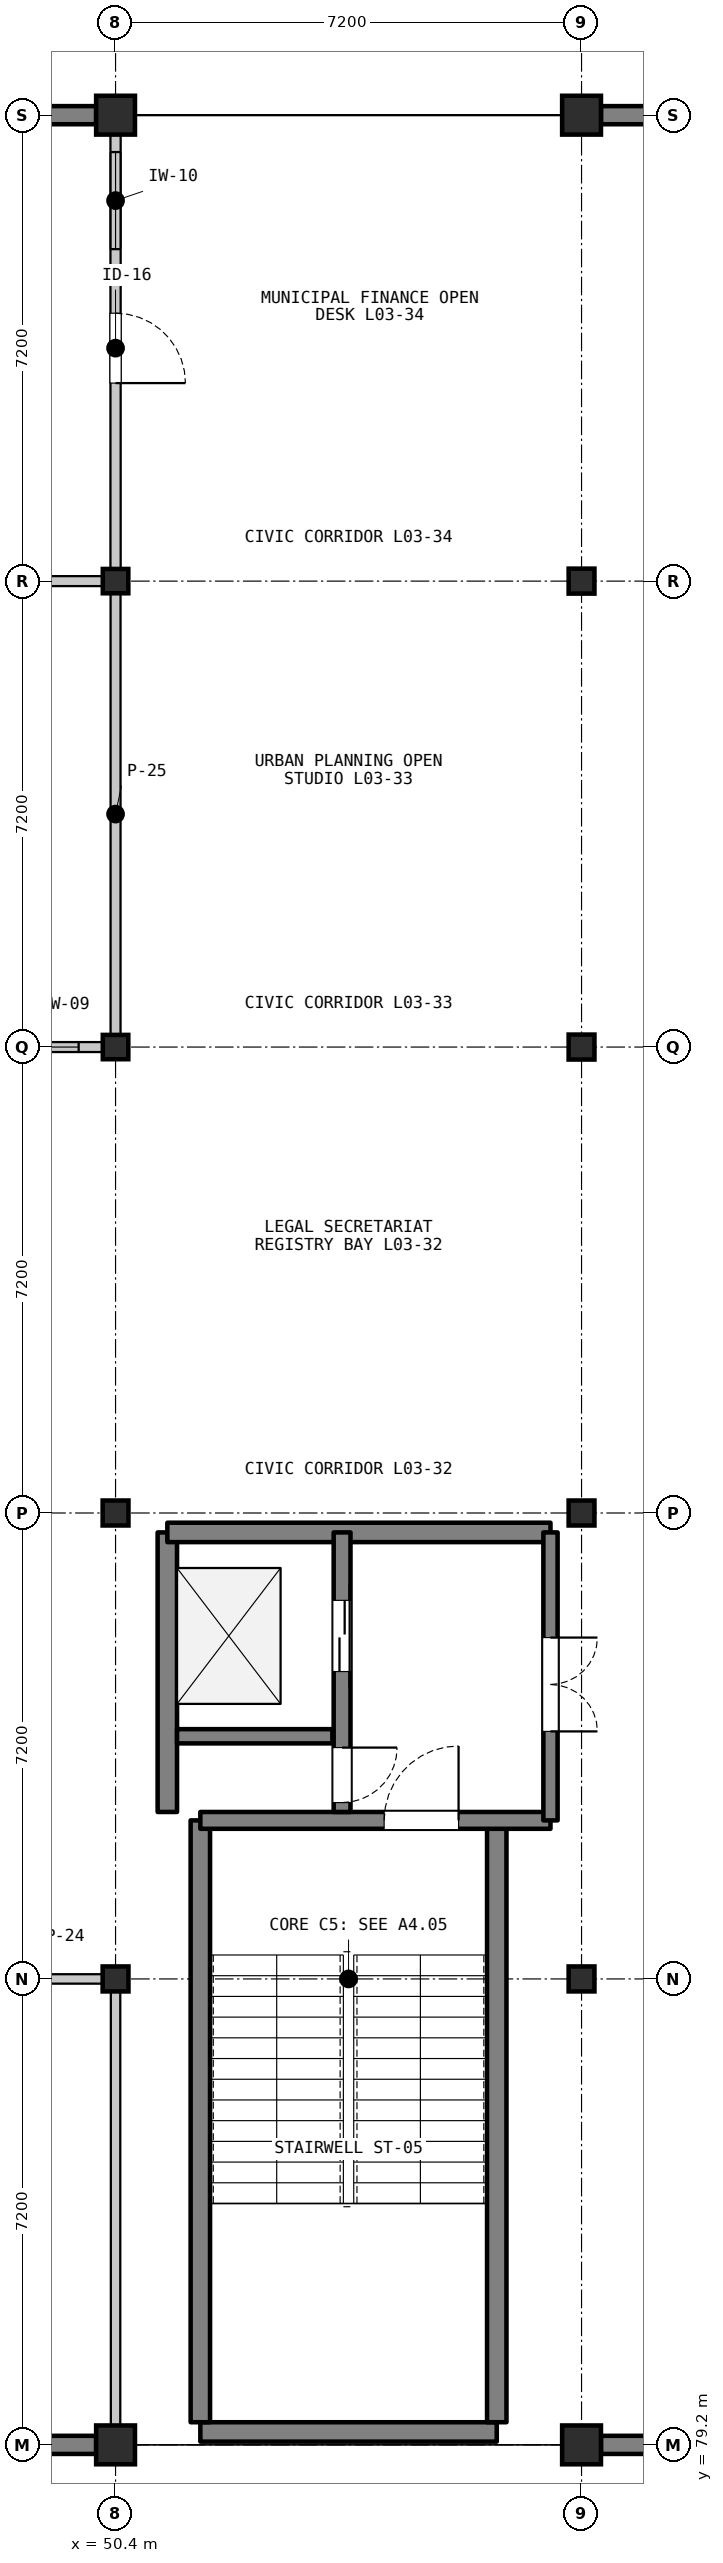
"""IFC4 building model, lengths in metres.
Left out: names, types, materials, properties, quantities, classifications, styles, units other than length and angle.
Written with IfcOpenShell. Run it as: python <this file> out.ifc"""

import sys

from ifc_helpers import new_model, si_unit, direction, frame, frame_2d, origin, origin_2d, place, context, subcontext, project, spatial, rectangle, i_section, extrude, element, fill, save


model = new_model("IFC4")
c1 = context("Model", 3, precision=1e-05, world=origin(), true_north=direction((0.0, 1.0)))
c2 = subcontext(c1, "Body", "Model", "MODEL_VIEW")
j1 = project(units=[si_unit("LENGTHUNIT", "METRE"), si_unit("PLANEANGLEUNIT", "RADIAN")], contexts=[c1])
p1 = place(None, origin())
s1 = spatial("IfcSite", under=j1, at=p1, CompositionType="ELEMENT")
p2 = place(p1, origin())
s2 = spatial("IfcBuilding", under=s1, at=p2, CompositionType="ELEMENT")
p3 = place(p2, frame((0.0, 0.0, 9.9)))
s3 = spatial("IfcBuildingStorey", under=s2, at=p3, CompositionType="ELEMENT", Elevation=9.9)
p4 = place(p3, frame((50.4, 79.2, 0.0), z_axis=(0.0, 0.0, 1.0), x_axis=(1.0, 0.0, 0.0)))
e1 = element("IfcColumn", 1, at=p4, inside=s3, PredefinedType="COLUMN", context=c2, shape_type="SweptSolid", body=[
    extrude(rectangle(XDim=0.6, YDim=0.6, at=origin_2d()), origin(), (0.0, 0.0, 1.0), 4.2),
])
for number, where, z_axis, x_axis in (
    (2, (50.4, 86.4, 0.0), (0.0, 0.0, 1.0), (1.0, 0.0, 0.0)),
    (3, (50.4, 93.6, 0.0), (0.0, 0.0, 1.0), (1.0, 0.0, 0.0)),
):
    element("IfcColumn", number, at=place(p3, frame(where, z_axis=z_axis, x_axis=x_axis)), inside=s3, PredefinedType="COLUMN", context=c2, shape_type="SweptSolid", body=[
        extrude(i_section(OverallWidth=0.399, OverallDepth=0.386, WebThickness=0.021, FlangeThickness=0.033, FilletRadius=0.015, at=origin_2d()), origin(), (0.0, 0.0, 1.0), 4.2),
    ])
for number, where, z_axis, x_axis in (
    (4, (50.4, 100.8, 0.0), (0.0, 0.0, 1.0), (1.0, 0.0, 0.0)),
    (5, (50.4, 108.0, 0.0), (0.0, 0.0, 1.0), (1.0, 0.0, 0.0)),
):
    element("IfcColumn", number, at=place(p3, frame(where, z_axis=z_axis, x_axis=x_axis)), inside=s3, PredefinedType="COLUMN", context=c2, shape_type="SweptSolid", body=[
        extrude(i_section(OverallWidth=0.394, OverallDepth=0.376, WebThickness=0.017, FlangeThickness=0.028, FilletRadius=0.015, at=origin_2d()), origin(), (0.0, 0.0, 1.0), 4.2),
    ])
for number, where, z_axis, x_axis in (
    (6, (50.4, 115.2, 0.0), (0.0, 0.0, 1.0), (1.0, 0.0, 0.0)),
    (7, (57.6, 79.2, 0.0), (0.0, 0.0, 1.0), (1.0, 0.0, 0.0)),
):
    element("IfcColumn", number, at=place(p3, frame(where, z_axis=z_axis, x_axis=x_axis)), inside=s3, PredefinedType="COLUMN", context=c2, shape_type="SweptSolid", body=[
        extrude(rectangle(XDim=0.6, YDim=0.6, at=origin_2d()), origin(), (0.0, 0.0, 1.0), 4.2),
    ])
for number, where, z_axis, x_axis in (
    (8, (57.6, 86.4, 0.0), (0.0, 0.0, 1.0), (1.0, 0.0, 0.0)),
    (9, (57.6, 93.6, 0.0), (0.0, 0.0, 1.0), (1.0, 0.0, 0.0)),
    (10, (57.6, 100.8, 0.0), (0.0, 0.0, 1.0), (1.0, 0.0, 0.0)),
    (11, (57.6, 108.0, 0.0), (0.0, 0.0, 1.0), (1.0, 0.0, 0.0)),
):
    element("IfcColumn", number, at=place(p3, frame(where, z_axis=z_axis, x_axis=x_axis)), inside=s3, PredefinedType="COLUMN", context=c2, shape_type="SweptSolid", body=[
        extrude(i_section(OverallWidth=0.399, OverallDepth=0.386, WebThickness=0.021, FlangeThickness=0.033, FilletRadius=0.015, at=origin_2d()), origin(), (0.0, 0.0, 1.0), 4.2),
    ])
p5 = place(p3, frame((57.6, 115.2, 0.0), z_axis=(0.0, 0.0, 1.0), x_axis=(1.0, 0.0, 0.0)))
e12 = element("IfcColumn", 12, at=p5, inside=s3, PredefinedType="COLUMN", context=c2, shape_type="SweptSolid", body=[
    extrude(rectangle(XDim=0.6, YDim=0.6, at=origin_2d()), origin(), (0.0, 0.0, 1.0), 4.2),
])
p6 = place(p3, frame((50.1, 79.2, 0.0), z_axis=(0.0, 0.0, 1.0), x_axis=(-1.0, 0.0, 0.0)))
e13 = element("IfcWall", 13, at=p6, inside=s3, PredefinedType="SOLIDWALL", context=c2, shape_type="SweptSolid", body=[
    extrude(rectangle(XDim=6.6, YDim=0.28, at=frame_2d((3.3, 0.0))), origin(), (0.0, 0.0, 1.0), 3.418),
])
p7 = place(p3, frame((43.5, 115.2, 0.0), z_axis=(0.0, 0.0, 1.0), x_axis=(1.0, 0.0, 0.0)))
e14 = element("IfcWall", 14, at=p7, inside=s3, PredefinedType="SOLIDWALL", context=c2, shape_type="SweptSolid", body=[
    extrude(rectangle(XDim=6.6, YDim=0.28, at=frame_2d((3.3, 0.0))), origin(), (0.0, 0.0, 1.0), 3.418),
])
p8 = place(p7, frame((0.959, 0.0, 0.95)))
e15 = element("IfcOpeningElement", 15, at=p8, cuts=e14, PredefinedType="OPENING", context=c2, shape_type="SweptSolid", body=[
    extrude(rectangle(XDim=1.25, YDim=1.85, at=frame_2d((0.625, 0.925))), frame((0.0, 0.15, 0.0), z_axis=(0.0, -1.0, 0.0), x_axis=(1.0, 0.0, 0.0)), (0.0, 0.0, 1.0), 0.3),
])
p9 = place(p7, frame((4.391, 0.0, 0.95)))
e16 = element("IfcOpeningElement", 16, at=p9, cuts=e14, PredefinedType="OPENING", context=c2, shape_type="SweptSolid", body=[
    extrude(rectangle(XDim=1.25, YDim=1.85, at=frame_2d((0.625, 0.925))), frame((0.0, 0.15, 0.0), z_axis=(0.0, -1.0, 0.0), x_axis=(1.0, 0.0, 0.0)), (0.0, 0.0, 1.0), 0.3),
])
for number, where, z_axis, x_axis in (
    (17, (64.5, 79.2, 0.0), (0.0, 0.0, 1.0), (-1.0, 0.0, 0.0)),
    (18, (57.9, 115.2, 0.0), (0.0, 0.0, 1.0), (1.0, 0.0, 0.0)),
):
    element("IfcWall", number, at=place(p3, frame(where, z_axis=z_axis, x_axis=x_axis)), inside=s3, PredefinedType="SOLIDWALL", context=c2, shape_type="SweptSolid", body=[
        extrude(rectangle(XDim=6.6, YDim=0.28, at=frame_2d((3.3, 0.0))), origin(), (0.0, 0.0, 1.0), 3.418),
    ])
p10 = place(p3, frame((51.71, 79.4, 0.0), z_axis=(0.0, 0.0, 1.0), x_axis=(1.0, 0.0, 0.0)))
e19 = element("IfcWall", 19, at=p10, inside=s3, PredefinedType="SHEAR", context=c2, shape_type="SweptSolid", body=[
    extrude(rectangle(XDim=4.58, YDim=0.3, at=frame_2d((2.29, 0.0))), origin(), (0.0, 0.0, 1.0), 4.02),
])
for number, where, z_axis, x_axis in (
    (20, (51.71, 79.55, 0.0), (0.0, 0.0, 1.0), (0.0, 1.0, 0.0)),
    (21, (56.29, 79.55, 0.0), (0.0, 0.0, 1.0), (0.0, 1.0, 0.0)),
):
    element("IfcWall", number, at=place(p3, frame(where, z_axis=z_axis, x_axis=x_axis)), inside=s3, PredefinedType="SHEAR", context=c2, shape_type="SweptSolid", body=[
        extrude(rectangle(XDim=9.3, YDim=0.3, at=frame_2d((4.65, 0.0))), origin(), (0.0, 0.0, 1.0), 4.02),
    ])
p11 = place(p3, frame((51.71, 88.85, 0.0), z_axis=(0.0, 0.0, 1.0), x_axis=(1.0, 0.0, 0.0)))
e22 = element("IfcWall", 22, at=p11, inside=s3, PredefinedType="SHEAR", context=c2, shape_type="SweptSolid", body=[
    extrude(rectangle(XDim=5.41, YDim=0.26, at=frame_2d((2.705, 0.0))), origin(), (0.0, 0.0, 1.0), 4.02),
])
p12 = place(p11, frame((2.84, 0.0, 0.0)))
e23 = element("IfcOpeningElement", 23, at=p12, cuts=e22, PredefinedType="OPENING", context=c2, shape_type="SweptSolid", body=[
    extrude(rectangle(XDim=1.15, YDim=2.15, at=frame_2d((0.575, 1.075))), frame((0.0, 0.14, 0.0), z_axis=(0.0, -1.0, 0.0), x_axis=(1.0, 0.0, 0.0)), (0.0, 0.0, 1.0), 0.28),
])
p13 = place(p3, frame((51.2, 88.98, 0.0), z_axis=(0.0, 0.0, 1.0), x_axis=(0.0, 1.0, 0.0)))
e24 = element("IfcWall", 24, at=p13, inside=s3, PredefinedType="SHEAR", context=c2, shape_type="SweptSolid", body=[
    extrude(rectangle(XDim=4.32, YDim=0.3, at=frame_2d((2.16, 0.0))), origin(), (0.0, 0.0, 1.0), 4.02),
])
p14 = place(p3, frame((51.2, 93.3, 0.0), z_axis=(0.0, 0.0, 1.0), x_axis=(1.0, 0.0, 0.0)))
e25 = element("IfcWall", 25, at=p14, inside=s3, PredefinedType="SHEAR", context=c2, shape_type="SweptSolid", body=[
    extrude(rectangle(XDim=5.92, YDim=0.3, at=frame_2d((2.96, 0.0))), origin(), (0.0, 0.0, 1.0), 4.02),
])
p15 = place(p3, frame((51.35, 90.15, 0.0), z_axis=(0.0, 0.0, 1.0), x_axis=(1.0, 0.0, 0.0)))
e26 = element("IfcWall", 26, at=p15, inside=s3, PredefinedType="SHEAR", context=c2, shape_type="SweptSolid", body=[
    extrude(rectangle(XDim=2.4, YDim=0.22, at=frame_2d((1.2, 0.0))), origin(), (0.0, 0.0, 1.0), 4.02),
])
p16 = place(p3, frame((53.9, 93.3, 0.0), z_axis=(0.0, 0.0, 1.0), x_axis=(0.0, -1.0, 0.0)))
e27 = element("IfcWall", 27, at=p16, inside=s3, PredefinedType="SHEAR", context=c2, shape_type="SweptSolid", body=[
    extrude(rectangle(XDim=4.32, YDim=0.26, at=frame_2d((2.16, 0.0))), origin(), (0.0, 0.0, 1.0), 4.02),
])
p17 = place(p16, frame((1.05, 0.0, 0.0)))
e28 = element("IfcOpeningElement", 28, at=p17, cuts=e27, PredefinedType="OPENING", context=c2, shape_type="SweptSolid", body=[
    extrude(rectangle(XDim=1.1, YDim=2.15, at=frame_2d((0.55, 1.075))), frame((0.0, 0.14, 0.0), z_axis=(0.0, -1.0, 0.0), x_axis=(1.0, 0.0, 0.0)), (0.0, 0.0, 1.0), 0.28),
])
p18 = place(p16, frame((3.325, 0.0, 0.0)))
e29 = element("IfcOpeningElement", 29, at=p18, cuts=e27, PredefinedType="OPENING", context=c2, shape_type="SweptSolid", body=[
    extrude(rectangle(XDim=0.85, YDim=2.05, at=frame_2d((0.425, 1.025))), frame((0.0, 0.14, 0.0), z_axis=(0.0, -1.0, 0.0), x_axis=(1.0, 0.0, 0.0)), (0.0, 0.0, 1.0), 0.28),
])
p19 = place(p3, frame((57.12, 93.3, 0.0), z_axis=(0.0, 0.0, 1.0), x_axis=(0.0, -1.0, 0.0)))
e30 = element("IfcWall", 30, at=p19, inside=s3, PredefinedType="SHEAR", context=c2, shape_type="SweptSolid", body=[
    extrude(rectangle(XDim=4.45, YDim=0.22, at=frame_2d((2.225, 0.0))), origin(), (0.0, 0.0, 1.0), 4.02),
])
p20 = place(p19, frame((1.625, 0.0, 0.0)))
e31 = element("IfcOpeningElement", 31, at=p20, cuts=e30, PredefinedType="OPENING", context=c2, shape_type="SweptSolid", body=[
    extrude(rectangle(XDim=1.45, YDim=2.2, at=frame_2d((0.725, 1.1))), frame((0.0, 0.12, 0.0), z_axis=(0.0, -1.0, 0.0), x_axis=(1.0, 0.0, 0.0)), (0.0, 0.0, 1.0), 0.24),
])
p21 = place(p3, frame((43.48, 86.4, 0.0), z_axis=(0.0, 0.0, 1.0), x_axis=(1.0, 0.0, 0.0)))
e32 = element("IfcWall", 32, at=p21, inside=s3, PredefinedType="PARTITIONING", context=c2, shape_type="SweptSolid", body=[
    extrude(rectangle(XDim=6.8, YDim=0.146, at=frame_2d((3.4, 0.0))), origin(), (0.0, 0.0, 1.0), 3.408),
])
p22 = place(p21, frame((2.875, 0.0, 0.0)))
e33 = element("IfcOpeningElement", 33, at=p22, cuts=e32, PredefinedType="OPENING", context=c2, shape_type="SweptSolid", body=[
    extrude(rectangle(XDim=1.05, YDim=2.15, at=frame_2d((0.525, 1.075))), frame((0.0, 0.083, 0.0), z_axis=(0.0, -1.0, 0.0), x_axis=(1.0, 0.0, 0.0)), (0.0, 0.0, 1.0), 0.166),
])
p23 = place(p21, frame((0.45, 0.0, 1.05)))
e34 = element("IfcOpeningElement", 34, at=p23, cuts=e32, PredefinedType="OPENING", context=c2, shape_type="SweptSolid", body=[
    extrude(rectangle(XDim=1.4, YDim=1.2, at=frame_2d((0.7, 0.6))), frame((0.0, 0.083, 0.0), z_axis=(0.0, -1.0, 0.0), x_axis=(1.0, 0.0, 0.0)), (0.0, 0.0, 1.0), 0.166),
])
p24 = place(p3, frame((50.4, 86.28, 0.0), z_axis=(0.0, 0.0, 1.0), x_axis=(0.0, -1.0, 0.0)))
e35 = element("IfcWall", 35, at=p24, inside=s3, PredefinedType="PARTITIONING", context=c2, shape_type="SweptSolid", body=[
    extrude(rectangle(XDim=6.96, YDim=0.146, at=frame_2d((3.48, 0.0))), origin(), (0.0, 0.0, 1.0), 3.408),
])
p25 = place(p3, frame((50.28, 100.8, 0.0), z_axis=(0.0, 0.0, 1.0), x_axis=(-1.0, 0.0, 0.0)))
e36 = element("IfcWall", 36, at=p25, inside=s3, PredefinedType="PARTITIONING", context=c2, shape_type="SweptSolid", body=[
    extrude(rectangle(XDim=6.96, YDim=0.154, at=frame_2d((3.48, 0.0))), origin(), (0.0, 0.0, 1.0), 3.408),
])
p26 = place(p25, frame((3.005, 0.0, 0.0)))
e37 = element("IfcOpeningElement", 37, at=p26, cuts=e36, PredefinedType="OPENING", context=c2, shape_type="SweptSolid", body=[
    extrude(rectangle(XDim=0.95, YDim=2.15, at=frame_2d((0.475, 1.075))), frame((0.0, 0.087, 0.0), z_axis=(0.0, -1.0, 0.0), x_axis=(1.0, 0.0, 0.0)), (0.0, 0.0, 1.0), 0.174),
])
p27 = place(p25, frame((0.45, 0.0, 1.05)))
e38 = element("IfcOpeningElement", 38, at=p27, cuts=e36, PredefinedType="OPENING", context=c2, shape_type="SweptSolid", body=[
    extrude(rectangle(XDim=1.45, YDim=1.15, at=frame_2d((0.725, 0.575))), frame((0.0, 0.087, 0.0), z_axis=(0.0, -1.0, 0.0), x_axis=(1.0, 0.0, 0.0)), (0.0, 0.0, 1.0), 0.174),
])
for number, where, z_axis, x_axis in (
    (39, (43.32, 108.0, 0.0), (0.0, 0.0, 1.0), (1.0, 0.0, 0.0)),
    (40, (50.4, 107.88, 0.0), (0.0, 0.0, 1.0), (0.0, -1.0, 0.0)),
):
    element("IfcWall", number, at=place(p3, frame(where, z_axis=z_axis, x_axis=x_axis)), inside=s3, PredefinedType="PARTITIONING", context=c2, shape_type="SweptSolid", body=[
        extrude(rectangle(XDim=6.96, YDim=0.154, at=frame_2d((3.48, 0.0))), origin(), (0.0, 0.0, 1.0), 3.408),
    ])
p28 = place(p3, frame((50.4, 115.08, 0.0), z_axis=(0.0, 0.0, 1.0), x_axis=(0.0, -1.0, 0.0)))
e41 = element("IfcWall", 41, at=p28, inside=s3, PredefinedType="PARTITIONING", context=c2, shape_type="SweptSolid", body=[
    extrude(rectangle(XDim=6.96, YDim=0.158, at=frame_2d((3.48, 0.0))), origin(), (0.0, 0.0, 1.0), 3.408),
])
p29 = place(p28, frame((2.94, 0.0, 0.0)))
e42 = element("IfcOpeningElement", 42, at=p29, cuts=e41, PredefinedType="OPENING", context=c2, shape_type="SweptSolid", body=[
    extrude(rectangle(XDim=1.08, YDim=2.2, at=frame_2d((0.54, 1.1))), frame((0.0, 0.089, 0.0), z_axis=(0.0, -1.0, 0.0), x_axis=(1.0, 0.0, 0.0)), (0.0, 0.0, 1.0), 0.178),
])
p30 = place(p28, frame((0.45, 0.0, 1.05)))
e43 = element("IfcOpeningElement", 43, at=p30, cuts=e41, PredefinedType="OPENING", context=c2, shape_type="SweptSolid", body=[
    extrude(rectangle(XDim=1.5, YDim=1.15, at=frame_2d((0.75, 0.575))), frame((0.0, 0.089, 0.0), z_axis=(0.0, -1.0, 0.0), x_axis=(1.0, 0.0, 0.0)), (0.0, 0.0, 1.0), 0.178),
])
p31 = place(p12, origin())
e44 = element("IfcDoor", 44, at=p31, inside=s3, OperationType="SINGLE_SWING_RIGHT", PredefinedType="DOOR", context=c2, shape_type="SweptSolid", body=[
    extrude(rectangle(XDim=1.15, YDim=2.15, at=frame_2d((0.575, 1.075))), frame((0.0, 0.025, 0.0), z_axis=(0.0, -1.0, 0.0), x_axis=(1.0, 0.0, 0.0)), (0.0, 0.0, 1.0), 0.05),
])
fill(e23, e44)
p32 = place(p17, origin())
e45 = element("IfcDoor", 45, at=p32, inside=s3, OperationType="DOUBLE_DOOR_SLIDING", PredefinedType="DOOR", context=c2, shape_type="SweptSolid", body=[
    extrude(rectangle(XDim=1.1, YDim=2.15, at=frame_2d((0.55, 1.075))), frame((0.0, 0.025, 0.0), z_axis=(0.0, -1.0, 0.0), x_axis=(1.0, 0.0, 0.0)), (0.0, 0.0, 1.0), 0.05),
])
fill(e28, e45)
p33 = place(p18, origin())
e46 = element("IfcDoor", 46, at=p33, inside=s3, OperationType="SINGLE_SWING_LEFT", PredefinedType="DOOR", context=c2, shape_type="SweptSolid", body=[
    extrude(rectangle(XDim=0.85, YDim=2.05, at=frame_2d((0.425, 1.025))), frame((0.0, 0.025, 0.0), z_axis=(0.0, -1.0, 0.0), x_axis=(1.0, 0.0, 0.0)), (0.0, 0.0, 1.0), 0.05),
])
fill(e29, e46)
p34 = place(p20, origin())
e47 = element("IfcDoor", 47, at=p34, inside=s3, OperationType="DOUBLE_DOOR_SINGLE_SWING", PredefinedType="DOOR", context=c2, shape_type="SweptSolid", body=[
    extrude(rectangle(XDim=1.45, YDim=2.2, at=frame_2d((0.725, 1.1))), frame((0.0, 0.025, 0.0), z_axis=(0.0, -1.0, 0.0), x_axis=(1.0, 0.0, 0.0)), (0.0, 0.0, 1.0), 0.05),
])
fill(e31, e47)
p35 = place(p27, origin())
e48 = element("IfcWindow", 48, at=p35, inside=s3, PartitioningType="SINGLE_PANEL", PredefinedType="WINDOW", context=c2, shape_type="SweptSolid", body=[
    extrude(rectangle(XDim=1.45, YDim=1.15, at=frame_2d((0.725, 0.575))), frame((0.0, 0.03, 0.0), z_axis=(0.0, -1.0, 0.0), x_axis=(1.0, 0.0, 0.0)), (0.0, 0.0, 1.0), 0.06),
])
fill(e38, e48)
p36 = place(p29, origin())
e49 = element("IfcDoor", 49, at=p36, inside=s3, OperationType="SINGLE_SWING_RIGHT", PredefinedType="DOOR", context=c2, shape_type="SweptSolid", body=[
    extrude(rectangle(XDim=1.08, YDim=2.2, at=frame_2d((0.54, 1.1))), frame((0.0, 0.025, 0.0), z_axis=(0.0, -1.0, 0.0), x_axis=(1.0, 0.0, 0.0)), (0.0, 0.0, 1.0), 0.05),
])
fill(e42, e49)
p37 = place(p30, origin())
e50 = element("IfcWindow", 50, at=p37, inside=s3, PartitioningType="SINGLE_PANEL", PredefinedType="WINDOW", context=c2, shape_type="SweptSolid", body=[
    extrude(rectangle(XDim=1.5, YDim=1.15, at=frame_2d((0.75, 0.575))), frame((0.0, 0.03, 0.0), z_axis=(0.0, -1.0, 0.0), x_axis=(1.0, 0.0, 0.0)), (0.0, 0.0, 1.0), 0.06),
])
fill(e43, e50)
save(model, sys.argv[1])
